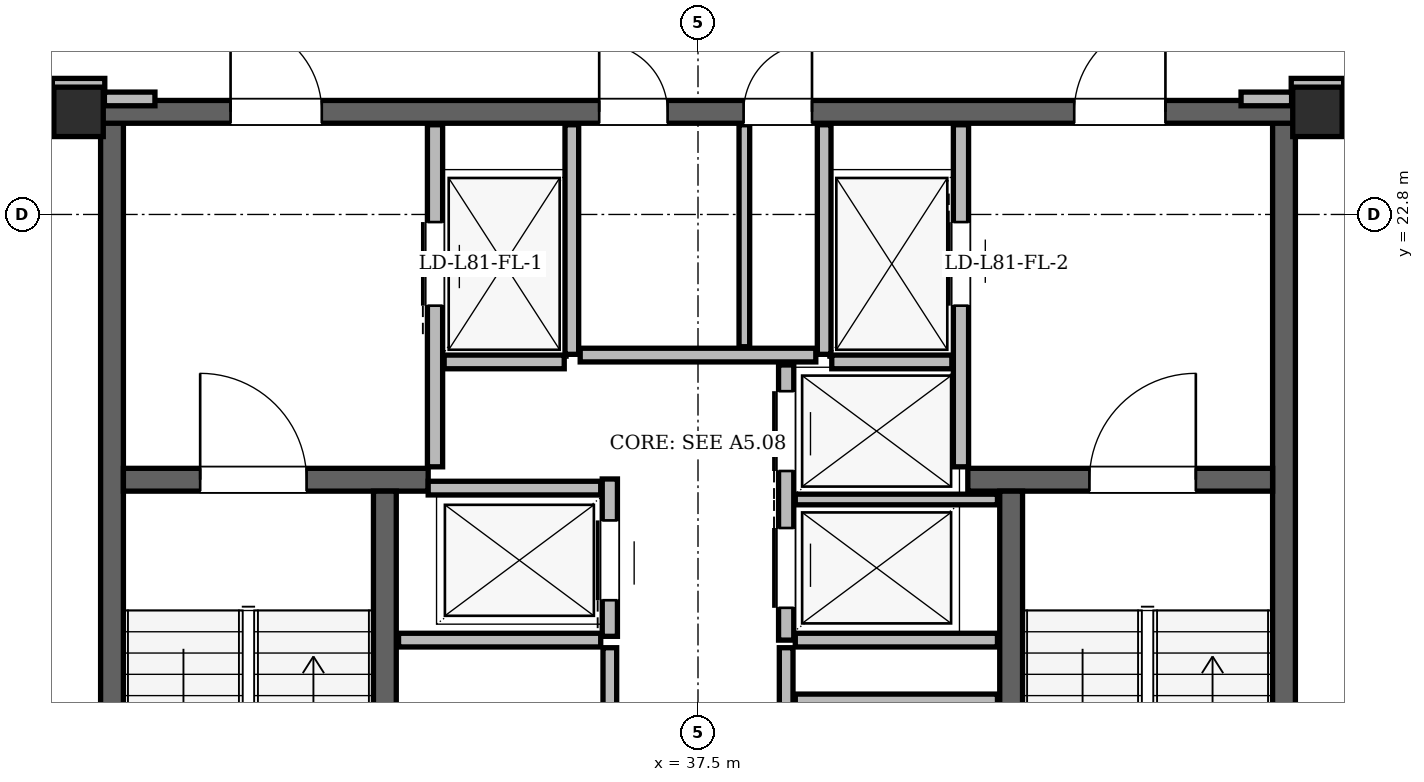
"""IFC4 building model, lengths in metres.
Left out: names, types, materials, properties, quantities, classifications, styles, units other than length and angle.
Written with IfcOpenShell. Run it as: python <this file> out.ifc"""

import sys

from ifc_helpers import new_model, si_unit, direction, frame, frame_2d, origin, origin_2d, place, context, subcontext, project, spatial, rectangle, hollow_rectangle, extrude, element, fill, save


model = new_model("IFC4")
c1 = context("Model", 3, precision=1e-05, world=origin(), true_north=direction((0.0, 1.0)))
c2 = subcontext(c1, "Body", "Model", "MODEL_VIEW")
j1 = project(units=[si_unit("LENGTHUNIT", "METRE"), si_unit("PLANEANGLEUNIT", "RADIAN")], contexts=[c1])
p1 = place(None, origin())
s1 = spatial("IfcSite", under=j1, at=p1, CompositionType="ELEMENT")
p2 = place(p1, origin())
s2 = spatial("IfcBuilding", under=s1, at=p2, CompositionType="ELEMENT")
p3 = place(p2, frame((0.0, 0.0, 309.6)))
s3 = spatial("IfcBuildingStorey", under=s2, at=p3, CompositionType="ELEMENT", Elevation=309.6)
for number, where, z_axis, x_axis in (
    (1, (45.65, 24.15, 0.0), (0.0, 0.0, 1.0), (1.0, 0.0, 0.0)),
    (2, (29.35, 24.15, 0.0), (0.0, 0.0, 1.0), (1.0, 0.0, 0.0)),
):
    element("IfcColumn", number, at=place(p3, frame(where, z_axis=z_axis, x_axis=x_axis)), inside=s3, PredefinedType="COLUMN", context=c2, shape_type="SweptSolid", body=[
        extrude(hollow_rectangle(XDim=0.65, YDim=0.65, WallThickness=0.05, at=origin_2d()), origin(), (0.0, 0.0, 1.0), 4.5),
    ])
for number, where, z_axis, x_axis in (
    (3, (29.79, 11.0, 0.0), (0.0, 0.0, 1.0), (0.0, 1.0, 0.0)),
    (4, (45.21, 11.0, 0.0), (0.0, 0.0, 1.0), (0.0, 1.0, 0.0)),
):
    element("IfcWall", number, at=place(p3, frame(where, z_axis=z_axis, x_axis=x_axis)), inside=s3, PredefinedType="SHEAR", context=c2, shape_type="SweptSolid", body=[
        extrude(rectangle(XDim=13.3, YDim=0.3, at=frame_2d((6.65, 0.0))), origin(), (0.0, 0.0, 1.0), 4.24),
    ])
p4 = place(p3, frame((29.65, 24.15, 0.0), z_axis=(0.0, 0.0, 1.0), x_axis=(1.0, 0.0, 0.0)))
e5 = element("IfcWall", 5, at=p4, inside=s3, PredefinedType="SHEAR", context=c2, shape_type="SweptSolid", body=[
    extrude(rectangle(XDim=15.7, YDim=0.3, at=frame_2d((7.85, 0.0))), origin(), (0.0, 0.0, 1.0), 4.24),
])
p5 = place(p4, frame((1.7, 0.0, 0.0)))
e6 = element("IfcOpeningElement", 6, at=p5, cuts=e5, PredefinedType="OPENING", context=c2, shape_type="SweptSolid", body=[
    extrude(rectangle(XDim=1.2, YDim=2.2, at=frame_2d((0.6, 1.1))), frame((0.0, 0.15, 0.0), z_axis=(0.0, -1.0, 0.0), x_axis=(1.0, 0.0, 0.0)), (0.0, 0.0, 1.0), 0.3),
])
p6 = place(p4, frame((12.8, 0.0, 0.0)))
e7 = element("IfcOpeningElement", 7, at=p6, cuts=e5, PredefinedType="OPENING", context=c2, shape_type="SweptSolid", body=[
    extrude(rectangle(XDim=1.2, YDim=2.2, at=frame_2d((0.6, 1.1))), frame((0.0, 0.15, 0.0), z_axis=(0.0, -1.0, 0.0), x_axis=(1.0, 0.0, 0.0)), (0.0, 0.0, 1.0), 0.3),
])
p7 = place(p4, frame((6.55, 0.0, 0.0)))
e8 = element("IfcOpeningElement", 8, at=p7, cuts=e5, PredefinedType="OPENING", context=c2, shape_type="SweptSolid", body=[
    extrude(rectangle(XDim=0.9, YDim=2.05, at=frame_2d((0.45, 1.025))), frame((0.0, 0.15, 0.0), z_axis=(0.0, -1.0, 0.0), x_axis=(1.0, 0.0, 0.0)), (0.0, 0.0, 1.0), 0.3),
])
p8 = place(p4, frame((8.45, 0.0, 0.0)))
e9 = element("IfcOpeningElement", 9, at=p8, cuts=e5, PredefinedType="OPENING", context=c2, shape_type="SweptSolid", body=[
    extrude(rectangle(XDim=0.9, YDim=2.05, at=frame_2d((0.45, 1.025))), frame((0.0, 0.15, 0.0), z_axis=(0.0, -1.0, 0.0), x_axis=(1.0, 0.0, 0.0)), (0.0, 0.0, 1.0), 0.3),
])
p9 = place(p3, frame((29.94, 19.31, 0.0), z_axis=(0.0, 0.0, 1.0), x_axis=(1.0, 0.0, 0.0)))
e10 = element("IfcWall", 10, at=p9, inside=s3, PredefinedType="SHEAR", context=c2, shape_type="SweptSolid", body=[
    extrude(rectangle(XDim=4.01, YDim=0.3, at=frame_2d((2.005, 0.0))), origin(), (0.0, 0.0, 1.0), 4.24),
])
p10 = place(p9, frame((1.01, 0.0, 0.0)))
e11 = element("IfcOpeningElement", 11, at=p10, cuts=e10, PredefinedType="OPENING", context=c2, shape_type="SweptSolid", body=[
    extrude(rectangle(XDim=1.4, YDim=2.2, at=frame_2d((0.7, 1.1))), frame((0.0, 0.15, 0.0), z_axis=(0.0, -1.0, 0.0), x_axis=(1.0, 0.0, 0.0)), (0.0, 0.0, 1.0), 0.3),
])
p11 = place(p3, frame((41.05, 19.31, 0.0), z_axis=(0.0, 0.0, 1.0), x_axis=(1.0, 0.0, 0.0)))
e12 = element("IfcWall", 12, at=p11, inside=s3, PredefinedType="SHEAR", context=c2, shape_type="SweptSolid", body=[
    extrude(rectangle(XDim=4.01, YDim=0.3, at=frame_2d((2.005, 0.0))), origin(), (0.0, 0.0, 1.0), 4.24),
])
p12 = place(p11, frame((1.6, 0.0, 0.0)))
e13 = element("IfcOpeningElement", 13, at=p12, cuts=e12, PredefinedType="OPENING", context=c2, shape_type="SweptSolid", body=[
    extrude(rectangle(XDim=1.4, YDim=2.2, at=frame_2d((0.7, 1.1))), frame((0.0, 0.15, 0.0), z_axis=(0.0, -1.0, 0.0), x_axis=(1.0, 0.0, 0.0)), (0.0, 0.0, 1.0), 0.3),
])
for number, where, z_axis, x_axis in (
    (14, (33.38, 11.54, 0.0), (0.0, 0.0, 1.0), (0.0, 1.0, 0.0)),
    (15, (41.62, 11.54, 0.0), (0.0, 0.0, 1.0), (0.0, 1.0, 0.0)),
):
    element("IfcWall", number, at=place(p3, frame(where, z_axis=z_axis, x_axis=x_axis)), inside=s3, PredefinedType="SHEAR", context=c2, shape_type="SweptSolid", body=[
        extrude(rectangle(XDim=7.62, YDim=0.3, at=frame_2d((3.81, 0.0))), origin(), (0.0, 0.0, 1.0), 4.24),
    ])
p13 = place(p3, frame((34.04, 19.48, 0.0), z_axis=(0.0, 0.0, 1.0), x_axis=(0.0, 1.0, 0.0)))
e16 = element("IfcWall", 16, at=p13, inside=s3, PredefinedType="PARTITIONING", context=c2, shape_type="SweptSolid", body=[
    extrude(rectangle(XDim=4.5, YDim=0.2, at=frame_2d((2.25, 0.0))), origin(), (0.0, 0.0, 1.0), 4.24),
])
p14 = place(p13, frame((2.12, 0.0, 0.0)))
e17 = element("IfcOpeningElement", 17, at=p14, cuts=e16, PredefinedType="OPENING", context=c2, shape_type="SweptSolid", body=[
    extrude(rectangle(XDim=1.1, YDim=2.2, at=frame_2d((0.55, 1.1))), frame((0.0, 0.1, 0.0), z_axis=(0.0, -1.0, 0.0), x_axis=(1.0, 0.0, 0.0)), (0.0, 0.0, 1.0), 0.2),
])
p15 = place(p3, frame((35.84, 20.96, 0.0), z_axis=(0.0, 0.0, 1.0), x_axis=(0.0, 1.0, 0.0)))
e18 = element("IfcWall", 18, at=p15, inside=s3, PredefinedType="PARTITIONING", context=c2, shape_type="SweptSolid", body=[
    extrude(rectangle(XDim=3.02, YDim=0.18, at=frame_2d((1.51, 0.0))), origin(), (0.0, 0.0, 1.0), 4.24),
])
p16 = place(p3, frame((34.16, 20.86, 0.0), z_axis=(0.0, 0.0, 1.0), x_axis=(1.0, 0.0, 0.0)))
e19 = element("IfcWall", 19, at=p16, inside=s3, PredefinedType="PARTITIONING", context=c2, shape_type="SweptSolid", body=[
    extrude(rectangle(XDim=1.58, YDim=0.18, at=frame_2d((0.79, 0.0))), origin(), (0.0, 0.0, 1.0), 4.24),
])
p17 = place(p3, frame((40.96, 19.48, 0.0), z_axis=(0.0, 0.0, 1.0), x_axis=(0.0, 1.0, 0.0)))
e20 = element("IfcWall", 20, at=p17, inside=s3, PredefinedType="PARTITIONING", context=c2, shape_type="SweptSolid", body=[
    extrude(rectangle(XDim=4.5, YDim=0.2, at=frame_2d((2.25, 0.0))), origin(), (0.0, 0.0, 1.0), 4.24),
])
p18 = place(p17, frame((2.12, 0.0, 0.0)))
e21 = element("IfcOpeningElement", 21, at=p18, cuts=e20, PredefinedType="OPENING", context=c2, shape_type="SweptSolid", body=[
    extrude(rectangle(XDim=1.1, YDim=2.2, at=frame_2d((0.55, 1.1))), frame((0.0, 0.1, 0.0), z_axis=(0.0, -1.0, 0.0), x_axis=(1.0, 0.0, 0.0)), (0.0, 0.0, 1.0), 0.2),
])
p19 = place(p3, frame((39.16, 20.96, 0.0), z_axis=(0.0, 0.0, 1.0), x_axis=(0.0, 1.0, 0.0)))
e22 = element("IfcWall", 22, at=p19, inside=s3, PredefinedType="PARTITIONING", context=c2, shape_type="SweptSolid", body=[
    extrude(rectangle(XDim=3.02, YDim=0.18, at=frame_2d((1.51, 0.0))), origin(), (0.0, 0.0, 1.0), 4.24),
])
p20 = place(p3, frame((39.26, 20.86, 0.0), z_axis=(0.0, 0.0, 1.0), x_axis=(1.0, 0.0, 0.0)))
e23 = element("IfcWall", 23, at=p20, inside=s3, PredefinedType="PARTITIONING", context=c2, shape_type="SweptSolid", body=[
    extrude(rectangle(XDim=1.58, YDim=0.18, at=frame_2d((0.79, 0.0))), origin(), (0.0, 0.0, 1.0), 4.24),
])
p21 = place(p3, frame((36.34, 17.25, 0.0), z_axis=(0.0, 0.0, 1.0), x_axis=(0.0, 1.0, 0.0)))
e24 = element("IfcWall", 24, at=p21, inside=s3, PredefinedType="PARTITIONING", context=c2, shape_type="SweptSolid", body=[
    extrude(rectangle(XDim=2.07, YDim=0.2, at=frame_2d((1.035, 0.0))), origin(), (0.0, 0.0, 1.0), 4.24),
])
p22 = place(p21, frame((0.475, 0.0, 0.0)))
e25 = element("IfcOpeningElement", 25, at=p22, cuts=e24, PredefinedType="OPENING", context=c2, shape_type="SweptSolid", body=[
    extrude(rectangle(XDim=1.05, YDim=2.15, at=frame_2d((0.525, 1.075))), frame((0.0, 0.1, 0.0), z_axis=(0.0, -1.0, 0.0), x_axis=(1.0, 0.0, 0.0)), (0.0, 0.0, 1.0), 0.2),
])
p23 = place(p3, frame((33.95, 19.2, 0.0), z_axis=(0.0, 0.0, 1.0), x_axis=(1.0, 0.0, 0.0)))
e26 = element("IfcWall", 26, at=p23, inside=s3, PredefinedType="PARTITIONING", context=c2, shape_type="SweptSolid", body=[
    extrude(rectangle(XDim=2.27, YDim=0.18, at=frame_2d((1.135, 0.0))), origin(), (0.0, 0.0, 1.0), 4.24),
])
p24 = place(p3, frame((33.56, 17.2, 0.0), z_axis=(0.0, 0.0, 1.0), x_axis=(1.0, 0.0, 0.0)))
e27 = element("IfcWall", 27, at=p24, inside=s3, PredefinedType="PARTITIONING", context=c2, shape_type="SweptSolid", body=[
    extrude(rectangle(XDim=2.66, YDim=0.18, at=frame_2d((1.33, 0.0))), origin(), (0.0, 0.0, 1.0), 4.24),
])
p25 = place(p3, frame((36.34, 11.55, 0.0), z_axis=(0.0, 0.0, 1.0), x_axis=(0.0, 1.0, 0.0)))
e28 = element("IfcWall", 28, at=p25, inside=s3, PredefinedType="PARTITIONING", context=c2, shape_type="SweptSolid", body=[
    extrude(rectangle(XDim=5.55, YDim=0.18, at=frame_2d((2.775, 0.0))), origin(), (0.0, 0.0, 1.0), 4.24),
])
p26 = place(p25, frame((2.85, 0.0, 0.0)))
e29 = element("IfcOpeningElement", 29, at=p26, cuts=e28, PredefinedType="OPENING", context=c2, shape_type="SweptSolid", body=[
    extrude(rectangle(XDim=0.95, YDim=2.1, at=frame_2d((0.475, 1.05))), frame((0.0, 0.09, 0.0), z_axis=(0.0, -1.0, 0.0), x_axis=(1.0, 0.0, 0.0)), (0.0, 0.0, 1.0), 0.18),
])
p27 = place(p3, frame((38.66, 17.2, 0.0), z_axis=(0.0, 0.0, 1.0), x_axis=(0.0, 1.0, 0.0)))
e30 = element("IfcWall", 30, at=p27, inside=s3, PredefinedType="PARTITIONING", context=c2, shape_type="SweptSolid", body=[
    extrude(rectangle(XDim=3.62, YDim=0.2, at=frame_2d((1.81, 0.0))), origin(), (0.0, 0.0, 1.0), 4.24),
])
p28 = place(p27, frame((0.425, 0.0, 0.0)))
e31 = element("IfcOpeningElement", 31, at=p28, cuts=e30, PredefinedType="OPENING", context=c2, shape_type="SweptSolid", body=[
    extrude(rectangle(XDim=1.05, YDim=2.15, at=frame_2d((0.525, 1.075))), frame((0.0, 0.1, 0.0), z_axis=(0.0, -1.0, 0.0), x_axis=(1.0, 0.0, 0.0)), (0.0, 0.0, 1.0), 0.2),
])
p29 = place(p27, frame((2.225, 0.0, 0.0)))
e32 = element("IfcOpeningElement", 32, at=p29, cuts=e30, PredefinedType="OPENING", context=c2, shape_type="SweptSolid", body=[
    extrude(rectangle(XDim=1.05, YDim=2.15, at=frame_2d((0.525, 1.075))), frame((0.0, 0.1, 0.0), z_axis=(0.0, -1.0, 0.0), x_axis=(1.0, 0.0, 0.0)), (0.0, 0.0, 1.0), 0.2),
])
p30 = place(p3, frame((38.78, 17.2, 0.0), z_axis=(0.0, 0.0, 1.0), x_axis=(1.0, 0.0, 0.0)))
e33 = element("IfcWall", 33, at=p30, inside=s3, PredefinedType="PARTITIONING", context=c2, shape_type="SweptSolid", body=[
    extrude(rectangle(XDim=2.66, YDim=0.18, at=frame_2d((1.33, 0.0))), origin(), (0.0, 0.0, 1.0), 4.24),
])
p31 = place(p3, frame((38.78, 19.05, 0.0), z_axis=(0.0, 0.0, 1.0), x_axis=(1.0, 0.0, 0.0)))
e34 = element("IfcWall", 34, at=p31, inside=s3, PredefinedType="PARTITIONING", context=c2, shape_type="SweptSolid", body=[
    extrude(rectangle(XDim=2.66, YDim=0.14, at=frame_2d((1.33, 0.0))), origin(), (0.0, 0.0, 1.0), 4.24),
])
p32 = place(p3, frame((38.66, 11.55, 0.0), z_axis=(0.0, 0.0, 1.0), x_axis=(0.0, 1.0, 0.0)))
e35 = element("IfcWall", 35, at=p32, inside=s3, PredefinedType="PARTITIONING", context=c2, shape_type="SweptSolid", body=[
    extrude(rectangle(XDim=5.55, YDim=0.18, at=frame_2d((2.775, 0.0))), origin(), (0.0, 0.0, 1.0), 4.24),
])
p33 = place(p32, frame((2.0, 0.0, 0.0)))
e36 = element("IfcOpeningElement", 36, at=p33, cuts=e35, PredefinedType="OPENING", context=c2, shape_type="SweptSolid", body=[
    extrude(rectangle(XDim=0.95, YDim=2.1, at=frame_2d((0.475, 1.05))), frame((0.0, 0.09, 0.0), z_axis=(0.0, -1.0, 0.0), x_axis=(1.0, 0.0, 0.0)), (0.0, 0.0, 1.0), 0.18),
])
p34 = place(p3, frame((38.78, 16.42, 0.0), z_axis=(0.0, 0.0, 1.0), x_axis=(1.0, 0.0, 0.0)))
e37 = element("IfcWall", 37, at=p34, inside=s3, PredefinedType="PARTITIONING", context=c2, shape_type="SweptSolid", body=[
    extrude(rectangle(XDim=2.66, YDim=0.14, at=frame_2d((1.33, 0.0))), origin(), (0.0, 0.0, 1.0), 4.24),
])
p35 = place(p3, frame((35.95, 20.95, 0.0), z_axis=(0.0, 0.0, 1.0), x_axis=(1.0, 0.0, 0.0)))
e38 = element("IfcWall", 38, at=p35, inside=s3, PredefinedType="PARTITIONING", context=c2, shape_type="SweptSolid", body=[
    extrude(rectangle(XDim=3.1, YDim=0.18, at=frame_2d((1.55, 0.0))), origin(), (0.0, 0.0, 1.0), 4.24),
])
p36 = place(p3, frame((38.11, 21.06, 0.0), z_axis=(0.0, 0.0, 1.0), x_axis=(0.0, 1.0, 0.0)))
e39 = element("IfcWall", 39, at=p36, inside=s3, PredefinedType="PARTITIONING", context=c2, shape_type="SweptSolid", body=[
    extrude(rectangle(XDim=2.92, YDim=0.14, at=frame_2d((1.46, 0.0))), origin(), (0.0, 0.0, 1.0), 4.24),
])
p37 = place(p3, frame((28.62, 24.32, 0.0), z_axis=(0.0, 0.0, 1.0), x_axis=(1.0, 0.0, 0.0)))
e40 = element("IfcWall", 40, at=p37, inside=s3, PredefinedType="PARTITIONING", context=c2, shape_type="SweptSolid", body=[
    extrude(rectangle(XDim=0.39, YDim=0.18, at=frame_2d((0.195, 0.0))), origin(), (0.0, 0.0, 1.0), 4.24),
])
for number, where, z_axis, x_axis in (
    (41, (29.69, 24.32, 0.0), (0.0, 0.0, 1.0), (1.0, 0.0, 0.0)),
    (42, (44.645, 24.32, 0.0), (0.0, 0.0, 1.0), (1.0, 0.0, 0.0)),
):
    element("IfcWall", number, at=place(p3, frame(where, z_axis=z_axis, x_axis=x_axis)), inside=s3, PredefinedType="PARTITIONING", context=c2, shape_type="SweptSolid", body=[
        extrude(rectangle(XDim=0.665, YDim=0.18, at=frame_2d((0.333, 0.0))), origin(), (0.0, 0.0, 1.0), 3.38),
    ])
p38 = place(p3, frame((45.99, 24.32, 0.0), z_axis=(0.0, 0.0, 1.0), x_axis=(1.0, 0.0, 0.0)))
e43 = element("IfcWall", 43, at=p38, inside=s3, PredefinedType="PARTITIONING", context=c2, shape_type="SweptSolid", body=[
    extrude(rectangle(XDim=0.39, YDim=0.18, at=frame_2d((0.195, 0.0))), origin(), (0.0, 0.0, 1.0), 4.24),
])
for number, where, z_axis, x_axis in (
    (44, (29.005, 24.5, 0.0), (0.0, 0.0, 1.0), (1.0, 0.0, 0.0)),
    (45, (45.305, 24.5, 0.0), (0.0, 0.0, 1.0), (1.0, 0.0, 0.0)),
):
    element("IfcWall", number, at=place(p3, frame(where, z_axis=z_axis, x_axis=x_axis)), inside=s3, PredefinedType="PARTITIONING", context=c2, shape_type="SweptSolid", body=[
        extrude(rectangle(XDim=0.69, YDim=0.18, at=frame_2d((0.345, 0.0))), origin(), (0.0, 0.0, 1.0), 3.826),
    ])
p39 = place(p14, origin())
e46 = element("IfcDoor", 46, at=p39, inside=s3, OperationType="SLIDING_TO_LEFT", PredefinedType="DOOR", context=c2, shape_type="SweptSolid", body=[
    extrude(rectangle(XDim=1.1, YDim=2.2, at=frame_2d((0.55, 1.1))), frame((0.0, 0.025, 0.0), z_axis=(0.0, -1.0, 0.0), x_axis=(1.0, 0.0, 0.0)), (0.0, 0.0, 1.0), 0.05),
])
fill(e17, e46)
p40 = place(p18, origin())
e47 = element("IfcDoor", 47, at=p40, inside=s3, OperationType="SLIDING_TO_RIGHT", PredefinedType="DOOR", context=c2, shape_type="SweptSolid", body=[
    extrude(rectangle(XDim=1.1, YDim=2.2, at=frame_2d((0.55, 1.1))), frame((0.0, 0.025, 0.0), z_axis=(0.0, -1.0, 0.0), x_axis=(1.0, 0.0, 0.0)), (0.0, 0.0, 1.0), 0.05),
])
fill(e21, e47)
p41 = place(p22, origin())
e48 = element("IfcDoor", 48, at=p41, inside=s3, OperationType="SLIDING_TO_LEFT", PredefinedType="DOOR", context=c2, shape_type="SweptSolid", body=[
    extrude(rectangle(XDim=1.05, YDim=2.15, at=frame_2d((0.525, 1.075))), frame((0.0, 0.025, 0.0), z_axis=(0.0, -1.0, 0.0), x_axis=(1.0, 0.0, 0.0)), (0.0, 0.0, 1.0), 0.05),
])
fill(e25, e48)
p42 = place(p28, origin())
e49 = element("IfcDoor", 49, at=p42, inside=s3, OperationType="SLIDING_TO_RIGHT", PredefinedType="DOOR", context=c2, shape_type="SweptSolid", body=[
    extrude(rectangle(XDim=1.05, YDim=2.15, at=frame_2d((0.525, 1.075))), frame((0.0, 0.025, 0.0), z_axis=(0.0, -1.0, 0.0), x_axis=(1.0, 0.0, 0.0)), (0.0, 0.0, 1.0), 0.05),
])
fill(e31, e49)
p43 = place(p29, origin())
e50 = element("IfcDoor", 50, at=p43, inside=s3, OperationType="SLIDING_TO_LEFT", PredefinedType="DOOR", context=c2, shape_type="SweptSolid", body=[
    extrude(rectangle(XDim=1.05, YDim=2.15, at=frame_2d((0.525, 1.075))), frame((0.0, 0.025, 0.0), z_axis=(0.0, -1.0, 0.0), x_axis=(1.0, 0.0, 0.0)), (0.0, 0.0, 1.0), 0.05),
])
fill(e32, e50)
p44 = place(p10, origin())
e51 = element("IfcDoor", 51, at=p44, inside=s3, OperationType="SINGLE_SWING_LEFT", PredefinedType="DOOR", context=c2, shape_type="SweptSolid", body=[
    extrude(rectangle(XDim=1.4, YDim=2.2, at=frame_2d((0.7, 1.1))), frame((0.0, 0.025, 0.0), z_axis=(0.0, -1.0, 0.0), x_axis=(1.0, 0.0, 0.0)), (0.0, 0.0, 1.0), 0.05),
])
fill(e11, e51)
p45 = place(p12, origin())
e52 = element("IfcDoor", 52, at=p45, inside=s3, OperationType="SINGLE_SWING_RIGHT", PredefinedType="DOOR", context=c2, shape_type="SweptSolid", body=[
    extrude(rectangle(XDim=1.4, YDim=2.2, at=frame_2d((0.7, 1.1))), frame((0.0, 0.025, 0.0), z_axis=(0.0, -1.0, 0.0), x_axis=(1.0, 0.0, 0.0)), (0.0, 0.0, 1.0), 0.05),
])
fill(e13, e52)
p46 = place(p5, origin())
e53 = element("IfcDoor", 53, at=p46, inside=s3, OperationType="SINGLE_SWING_LEFT", PredefinedType="DOOR", context=c2, shape_type="SweptSolid", body=[
    extrude(rectangle(XDim=1.2, YDim=2.2, at=frame_2d((0.6, 1.1))), frame((0.0, 0.025, 0.0), z_axis=(0.0, -1.0, 0.0), x_axis=(1.0, 0.0, 0.0)), (0.0, 0.0, 1.0), 0.05),
])
fill(e6, e53)
p47 = place(p6, origin())
e54 = element("IfcDoor", 54, at=p47, inside=s3, OperationType="SINGLE_SWING_RIGHT", PredefinedType="DOOR", context=c2, shape_type="SweptSolid", body=[
    extrude(rectangle(XDim=1.2, YDim=2.2, at=frame_2d((0.6, 1.1))), frame((0.0, 0.025, 0.0), z_axis=(0.0, -1.0, 0.0), x_axis=(1.0, 0.0, 0.0)), (0.0, 0.0, 1.0), 0.05),
])
fill(e7, e54)
p48 = place(p7, origin())
e55 = element("IfcDoor", 55, at=p48, inside=s3, OperationType="SINGLE_SWING_LEFT", PredefinedType="DOOR", context=c2, shape_type="SweptSolid", body=[
    extrude(rectangle(XDim=0.9, YDim=2.05, at=frame_2d((0.45, 1.025))), frame((0.0, 0.025, 0.0), z_axis=(0.0, -1.0, 0.0), x_axis=(1.0, 0.0, 0.0)), (0.0, 0.0, 1.0), 0.05),
])
fill(e8, e55)
p49 = place(p8, origin())
e56 = element("IfcDoor", 56, at=p49, inside=s3, OperationType="SINGLE_SWING_RIGHT", PredefinedType="DOOR", context=c2, shape_type="SweptSolid", body=[
    extrude(rectangle(XDim=0.9, YDim=2.05, at=frame_2d((0.45, 1.025))), frame((0.0, 0.025, 0.0), z_axis=(0.0, -1.0, 0.0), x_axis=(1.0, 0.0, 0.0)), (0.0, 0.0, 1.0), 0.05),
])
fill(e9, e56)
save(model, sys.argv[1])
